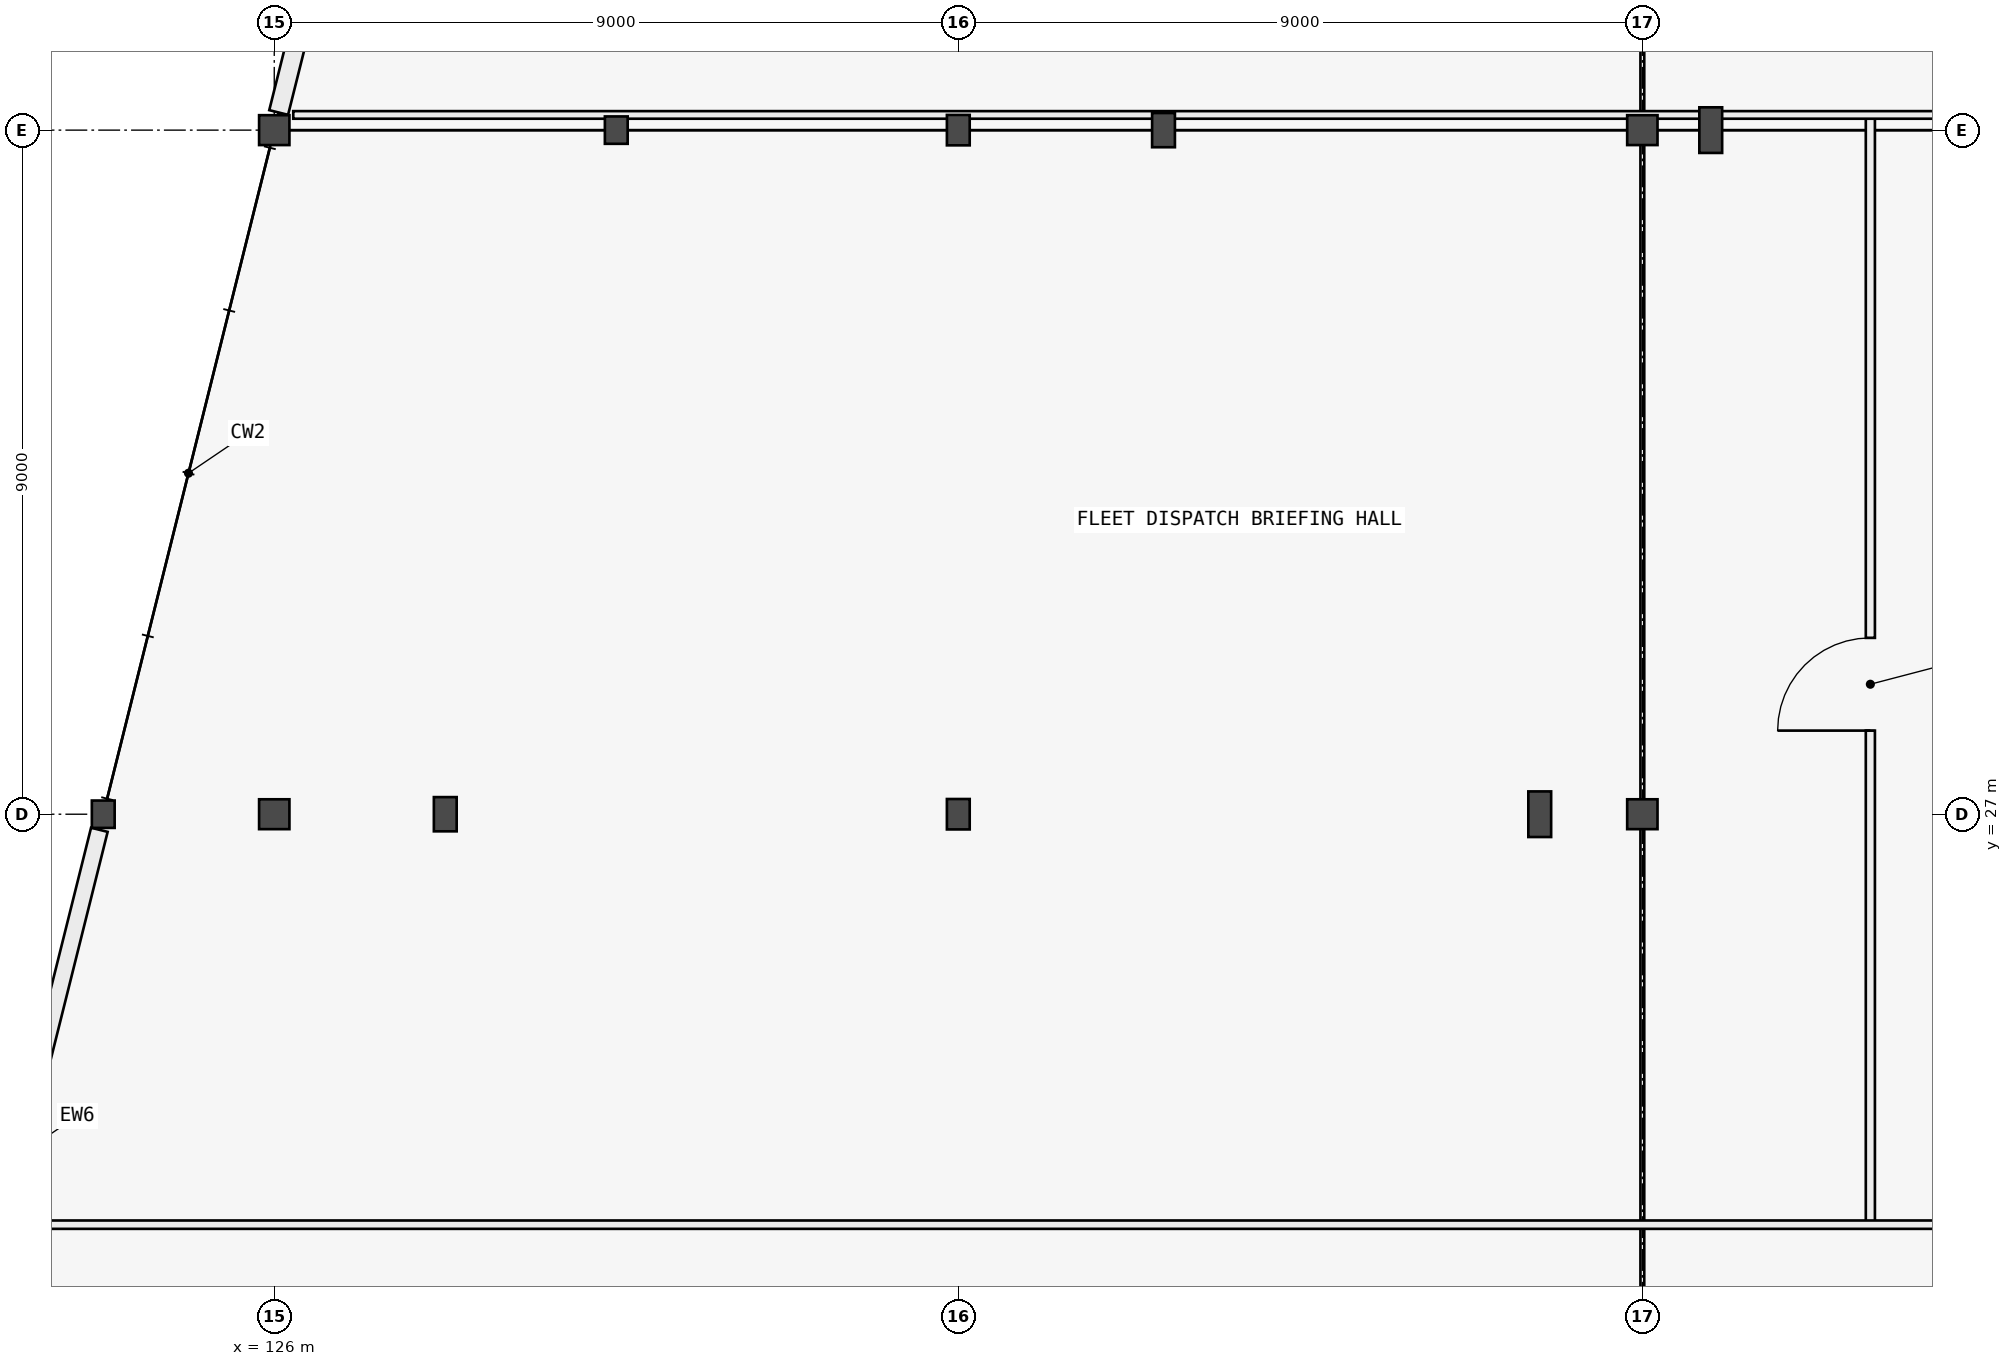
"""IFC4 building model, lengths in metres.
Left out: names, types, materials, properties, quantities, classifications, styles, units other than length and angle.
Written with IfcOpenShell. Run it as: python <this file> out.ifc"""

import sys

from ifc_helpers import new_model, si_unit, direction, frame, frame_2d, origin, origin_2d, place, context, subcontext, project, spatial, rectangle, i_section, extrude, element, fill, save


model = new_model("IFC4")
c1 = context("Model", 3, precision=1e-05, world=origin(), true_north=direction((0.0, 1.0)))
c2 = subcontext(c1, "Body", "Model", "MODEL_VIEW")
j1 = project(units=[si_unit("LENGTHUNIT", "METRE"), si_unit("PLANEANGLEUNIT", "RADIAN")], contexts=[c1])
p1 = place(None, origin())
s1 = spatial("IfcSite", under=j1, at=p1, CompositionType="ELEMENT")
p2 = place(p1, origin())
s2 = spatial("IfcBuilding", under=s1, at=p2, CompositionType="ELEMENT")
p3 = place(p2, frame((0.0, 0.0, 4.2)))
s3 = spatial("IfcBuildingStorey", under=s2, at=p3, CompositionType="ELEMENT", Elevation=4.2)
p4 = place(p3, frame((123.75, 27.0, 0.0), z_axis=(0.0, 0.0, 1.0), x_axis=(1.0, 0.0, 0.0)))
e1 = element("IfcColumn", 1, at=p4, inside=s3, PredefinedType="COLUMN", context=c2, shape_type="SweptSolid", body=[
    extrude(i_section(OverallWidth=0.3, OverallDepth=0.36, WebThickness=0.012, FlangeThickness=0.022, FilletRadius=0.027, at=origin_2d()), origin(), (0.0, 0.0, 1.0), 4.2),
])
p5 = place(p3, frame((126.0, 27.0, 0.0), z_axis=(0.0, 0.0, 1.0), x_axis=(1.0, 0.0, 0.0)))
e2 = element("IfcColumn", 2, at=p5, inside=s3, PredefinedType="COLUMN", context=c2, shape_type="SweptSolid", body=[
    extrude(i_section(OverallWidth=0.399, OverallDepth=0.393, WebThickness=0.018, FlangeThickness=0.028, FilletRadius=0.015, at=origin_2d()), origin(), (0.0, 0.0, 1.0), 4.2),
])
p6 = place(p3, frame((128.25, 27.0, 0.0), z_axis=(0.0, 0.0, 1.0), x_axis=(1.0, 0.0, 0.0)))
e3 = element("IfcColumn", 3, at=p6, inside=s3, PredefinedType="COLUMN", context=c2, shape_type="SweptSolid", body=[
    extrude(i_section(OverallWidth=0.3, OverallDepth=0.45, WebThickness=0.014, FlangeThickness=0.026, FilletRadius=0.027, at=origin_2d()), origin(), (0.0, 0.0, 1.0), 4.2),
])
p7 = place(p3, frame((135.0, 27.0, 0.0), z_axis=(0.0, 0.0, 1.0), x_axis=(1.0, 0.0, 0.0)))
e4 = element("IfcColumn", 4, at=p7, inside=s3, PredefinedType="COLUMN", context=c2, shape_type="SweptSolid", body=[
    extrude(i_section(OverallWidth=0.3, OverallDepth=0.4, WebThickness=0.013, FlangeThickness=0.024, FilletRadius=0.027, at=origin_2d()), origin(), (0.0, 0.0, 1.0), 4.2),
])
p8 = place(p3, frame((142.65, 27.0, 0.0), z_axis=(0.0, 0.0, 1.0), x_axis=(1.0, 0.0, 0.0)))
e5 = element("IfcColumn", 5, at=p8, inside=s3, PredefinedType="COLUMN", context=c2, shape_type="SweptSolid", body=[
    extrude(i_section(OverallWidth=0.3, OverallDepth=0.6, WebThickness=0.015, FlangeThickness=0.03, FilletRadius=0.027, at=origin_2d()), origin(), (0.0, 0.0, 1.0), 4.2),
])
for number, where, z_axis, x_axis in (
    (6, (144.0, 27.0, 0.0), (0.0, 0.0, 1.0), (1.0, 0.0, 0.0)),
    (7, (126.0, 36.0, 0.0), (0.0, 0.0, 1.0), (1.0, 0.0, 0.0)),
):
    element("IfcColumn", number, at=place(p3, frame(where, z_axis=z_axis, x_axis=x_axis)), inside=s3, PredefinedType="COLUMN", context=c2, shape_type="SweptSolid", body=[
        extrude(i_section(OverallWidth=0.399, OverallDepth=0.393, WebThickness=0.018, FlangeThickness=0.028, FilletRadius=0.015, at=origin_2d()), origin(), (0.0, 0.0, 1.0), 4.2),
    ])
p9 = place(p3, frame((130.5, 36.0, 0.0), z_axis=(0.0, 0.0, 1.0), x_axis=(1.0, 0.0, 0.0)))
e8 = element("IfcColumn", 8, at=p9, inside=s3, PredefinedType="COLUMN", context=c2, shape_type="SweptSolid", body=[
    extrude(i_section(OverallWidth=0.3, OverallDepth=0.36, WebThickness=0.012, FlangeThickness=0.022, FilletRadius=0.027, at=origin_2d()), origin(), (0.0, 0.0, 1.0), 4.2),
])
p10 = place(p3, frame((135.0, 36.0, 0.0), z_axis=(0.0, 0.0, 1.0), x_axis=(1.0, 0.0, 0.0)))
e9 = element("IfcColumn", 9, at=p10, inside=s3, PredefinedType="COLUMN", context=c2, shape_type="SweptSolid", body=[
    extrude(i_section(OverallWidth=0.3, OverallDepth=0.4, WebThickness=0.013, FlangeThickness=0.024, FilletRadius=0.027, at=origin_2d()), origin(), (0.0, 0.0, 1.0), 4.2),
])
p11 = place(p3, frame((137.7, 36.0, 0.0), z_axis=(0.0, 0.0, 1.0), x_axis=(1.0, 0.0, 0.0)))
e10 = element("IfcColumn", 10, at=p11, inside=s3, PredefinedType="COLUMN", context=c2, shape_type="SweptSolid", body=[
    extrude(i_section(OverallWidth=0.3, OverallDepth=0.45, WebThickness=0.014, FlangeThickness=0.026, FilletRadius=0.027, at=origin_2d()), origin(), (0.0, 0.0, 1.0), 4.2),
])
p12 = place(p3, frame((144.0, 36.0, 0.0), z_axis=(0.0, 0.0, 1.0), x_axis=(1.0, 0.0, 0.0)))
e11 = element("IfcColumn", 11, at=p12, inside=s3, PredefinedType="COLUMN", context=c2, shape_type="SweptSolid", body=[
    extrude(i_section(OverallWidth=0.399, OverallDepth=0.393, WebThickness=0.018, FlangeThickness=0.028, FilletRadius=0.015, at=origin_2d()), origin(), (0.0, 0.0, 1.0), 4.2),
])
p13 = place(p3, frame((144.9, 36.0, 0.0), z_axis=(0.0, 0.0, 1.0), x_axis=(1.0, 0.0, 0.0)))
e12 = element("IfcColumn", 12, at=p13, inside=s3, PredefinedType="COLUMN", context=c2, shape_type="SweptSolid", body=[
    extrude(i_section(OverallWidth=0.3, OverallDepth=0.6, WebThickness=0.015, FlangeThickness=0.03, FilletRadius=0.027, at=origin_2d()), origin(), (0.0, 0.0, 1.0), 4.2),
])
p14 = place(p3, frame((121.551, 18.205, 0.0), z_axis=(0.0, 0.0, 1.0), x_axis=(0.242509676291, 0.970148986963, 0.0)))
e13 = element("IfcWall", 13, at=p14, inside=s3, PredefinedType="STANDARD", context=c2, shape_type="SweptSolid", body=[
    extrude(rectangle(XDim=8.855, YDim=0.225, at=frame_2d((4.428, 0.0))), origin(), (0.0, 0.0, 1.0), 3.32),
])
p15 = place(p14, frame((3.827, 0.0, 0.95)))
e14 = element("IfcOpeningElement", 14, at=p15, cuts=e13, PredefinedType="OPENING", context=c2, shape_type="SweptSolid", body=[
    extrude(rectangle(XDim=1.2, YDim=1.35, at=frame_2d((0.6, 0.675))), frame((0.0, 0.123, 0.0), z_axis=(0.0, -1.0, 0.0), x_axis=(1.0, 0.0, 0.0)), (0.0, 0.0, 1.0), 0.245),
])
p16 = place(p3, frame((126.058, 36.232, 0.0), z_axis=(0.0, 0.0, 1.0), x_axis=(0.242509593434, 0.970149007675, 0.0)))
e15 = element("IfcWall", 15, at=p16, inside=s3, PredefinedType="POLYGONAL", context=c2, shape_type="SweptSolid", body=[
    extrude(rectangle(XDim=8.827, YDim=0.255, at=frame_2d((4.414, 0.0))), origin(), (0.0, 0.0, 1.0), 3.32),
])
p17 = place(p16, frame((3.664, 0.0, 0.95)))
e16 = element("IfcOpeningElement", 16, at=p17, cuts=e15, PredefinedType="OPENING", context=c2, shape_type="SweptSolid", body=[
    extrude(rectangle(XDim=1.5, YDim=1.5, at=frame_2d((0.75, 0.75))), frame((0.0, 0.137, 0.0), z_axis=(0.0, -1.0, 0.0), x_axis=(1.0, 0.0, 0.0)), (0.0, 0.0, 1.0), 0.275),
])
p18 = place(p3, frame((147.0, 21.6, 0.0), z_axis=(0.0, 0.0, 1.0), x_axis=(0.0, 1.0, 0.0)))
e17 = element("IfcWall", 17, at=p18, inside=s3, PredefinedType="PARTITIONING", context=c2, shape_type="SweptSolid", body=[
    extrude(rectangle(XDim=14.6, YDim=0.12, at=frame_2d((7.3, 0.0))), origin(), (0.0, 0.0, 1.0), 3.945),
])
p19 = place(p18, frame((6.5, 0.0, 0.0)))
e18 = element("IfcOpeningElement", 18, at=p19, cuts=e17, PredefinedType="OPENING", context=c2, shape_type="SweptSolid", body=[
    extrude(rectangle(XDim=1.22, YDim=2.18, at=frame_2d((0.61, 1.09))), frame((0.0, 0.07, 0.0), z_axis=(0.0, -1.0, 0.0), x_axis=(1.0, 0.0, 0.0)), (0.0, 0.0, 1.0), 0.14),
])
p20 = place(p3, frame((122.6, 21.6, 0.0), z_axis=(0.0, 0.0, 1.0), x_axis=(1.0, 0.0, 0.0)))
e19 = element("IfcWall", 19, at=p20, inside=s3, PredefinedType="PARTITIONING", context=c2, shape_type="SweptSolid", body=[
    extrude(rectangle(XDim=27.6, YDim=0.11, at=frame_2d((13.8, 0.0))), origin(), (0.0, 0.0, 1.0), 3.945),
])
p21 = place(p3, frame((126.25, 36.2, 0.0), z_axis=(0.0, 0.0, 1.0), x_axis=(1.0, 0.0, 0.0)))
e20 = element("IfcWall", 20, at=p21, inside=s3, PredefinedType="PARTITIONING", context=c2, shape_type="SweptSolid", body=[
    extrude(rectangle(XDim=32.35, YDim=0.1, at=frame_2d((16.175, 0.0))), origin(), (0.0, 0.0, 1.0), 3.42),
])
p22 = place(p19, origin())
e21 = element("IfcDoor", 21, at=p22, inside=s3, OperationType="SINGLE_SWING_LEFT", PredefinedType="DOOR", context=c2, shape_type="SweptSolid", body=[
    extrude(rectangle(XDim=1.22, YDim=2.18, at=frame_2d((0.61, 1.09))), frame((0.0, 0.025, 0.0), z_axis=(0.0, -1.0, 0.0), x_axis=(1.0, 0.0, 0.0)), (0.0, 0.0, 1.0), 0.05),
])
fill(e18, e21)
save(model, sys.argv[1])
